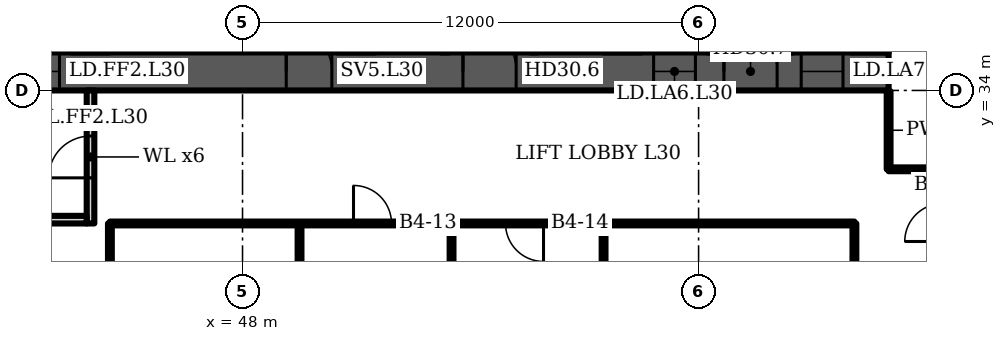
"""IFC4 building model, lengths in metres.
Left out: names, types, materials, properties, quantities, classifications, styles, units other than length and angle.
Written with IfcOpenShell. Run it as: python <this file> out.ifc"""

import sys

from ifc_helpers import new_model, si_unit, direction, frame, frame_2d, origin, place, context, subcontext, project, spatial, rectangle, extrude, element, fill, save


model = new_model("IFC4")
c1 = context("Model", 3, precision=1e-05, world=origin(), true_north=direction((0.0, 1.0)))
c2 = subcontext(c1, "Body", "Model", "MODEL_VIEW")
j1 = project(units=[si_unit("LENGTHUNIT", "METRE"), si_unit("PLANEANGLEUNIT", "RADIAN")], contexts=[c1])
p1 = place(None, origin())
s1 = spatial("IfcSite", under=j1, at=p1, CompositionType="ELEMENT")
p2 = place(p1, origin())
s2 = spatial("IfcBuilding", under=s1, at=p2, CompositionType="ELEMENT")
p3 = place(p2, frame((0.0, 0.0, 129.1)))
s3 = spatial("IfcBuildingStorey", under=s2, at=p3, CompositionType="ELEMENT", Elevation=129.1)
p4 = place(p3, frame((16.0, 34.5, 0.0), z_axis=(0.0, 0.0, 1.0), x_axis=(1.0, 0.0, 0.0)))
e1 = element("IfcWall", 1, at=p4, inside=s3, PredefinedType="SHEAR", context=c2, shape_type="SweptSolid", body=[
    extrude(rectangle(XDim=49.0, YDim=1.0, at=frame_2d((24.5, 0.0))), origin(), (0.0, 0.0, 1.0), 3.6),
])
p5 = place(p4, frame((1.2, 0.0, 0.0)))
e2 = element("IfcOpeningElement", 2, at=p5, cuts=e1, PredefinedType="OPENING", context=c2, shape_type="SweptSolid", body=[
    extrude(rectangle(XDim=1.1, YDim=2.1, at=frame_2d((0.55, 1.05))), frame((0.0, 0.51, 0.0), z_axis=(0.0, -1.0, 0.0), x_axis=(1.0, 0.0, 0.0)), (0.0, 0.0, 1.0), 1.02),
])
p6 = place(p4, frame((5.083, 0.0, 0.0)))
e3 = element("IfcOpeningElement", 3, at=p6, cuts=e1, PredefinedType="OPENING", context=c2, shape_type="SweptSolid", body=[
    extrude(rectangle(XDim=1.1, YDim=2.1, at=frame_2d((0.55, 1.05))), frame((0.0, 0.51, 0.0), z_axis=(0.0, -1.0, 0.0), x_axis=(1.0, 0.0, 0.0)), (0.0, 0.0, 1.0), 1.02),
])
p7 = place(p4, frame((2.933, 0.0, 0.0)))
e4 = element("IfcOpeningElement", 4, at=p7, cuts=e1, PredefinedType="OPENING", context=c2, shape_type="SweptSolid", body=[
    extrude(rectangle(XDim=1.4, YDim=2.1, at=frame_2d((0.7, 1.05))), frame((0.0, 0.51, 0.0), z_axis=(0.0, -1.0, 0.0), x_axis=(1.0, 0.0, 0.0)), (0.0, 0.0, 1.0), 1.02),
])
p8 = place(p4, frame((7.65, 0.0, 0.0)))
e5 = element("IfcOpeningElement", 5, at=p8, cuts=e1, PredefinedType="OPENING", context=c2, shape_type="SweptSolid", body=[
    extrude(rectangle(XDim=1.2, YDim=2.1, at=frame_2d((0.6, 1.05))), frame((0.0, 0.51, 0.0), z_axis=(0.0, -1.0, 0.0), x_axis=(1.0, 0.0, 0.0)), (0.0, 0.0, 1.0), 1.02),
])
p9 = place(p4, frame((14.817, 0.0, 0.0)))
e6 = element("IfcOpeningElement", 6, at=p9, cuts=e1, PredefinedType="OPENING", context=c2, shape_type="SweptSolid", body=[
    extrude(rectangle(XDim=1.1, YDim=2.1, at=frame_2d((0.55, 1.05))), frame((0.0, 0.51, 0.0), z_axis=(0.0, -1.0, 0.0), x_axis=(1.0, 0.0, 0.0)), (0.0, 0.0, 1.0), 1.02),
])
p10 = place(p4, frame((19.083, 0.0, 0.0)))
e7 = element("IfcOpeningElement", 7, at=p10, cuts=e1, PredefinedType="OPENING", context=c2, shape_type="SweptSolid", body=[
    extrude(rectangle(XDim=1.1, YDim=2.1, at=frame_2d((0.55, 1.05))), frame((0.0, 0.51, 0.0), z_axis=(0.0, -1.0, 0.0), x_axis=(1.0, 0.0, 0.0)), (0.0, 0.0, 1.0), 1.02),
])
p11 = place(p4, frame((16.8, 0.0, 0.0)))
e8 = element("IfcOpeningElement", 8, at=p11, cuts=e1, PredefinedType="OPENING", context=c2, shape_type="SweptSolid", body=[
    extrude(rectangle(XDim=1.4, YDim=2.1, at=frame_2d((0.7, 1.05))), frame((0.0, 0.51, 0.0), z_axis=(0.0, -1.0, 0.0), x_axis=(1.0, 0.0, 0.0)), (0.0, 0.0, 1.0), 1.02),
])
p12 = place(p4, frame((21.817, 0.0, 0.0)))
e9 = element("IfcOpeningElement", 9, at=p12, cuts=e1, PredefinedType="OPENING", context=c2, shape_type="SweptSolid", body=[
    extrude(rectangle(XDim=1.1, YDim=2.1, at=frame_2d((0.55, 1.05))), frame((0.0, 0.51, 0.0), z_axis=(0.0, -1.0, 0.0), x_axis=(1.0, 0.0, 0.0)), (0.0, 0.0, 1.0), 1.02),
])
p13 = place(p4, frame((26.083, 0.0, 0.0)))
e10 = element("IfcOpeningElement", 10, at=p13, cuts=e1, PredefinedType="OPENING", context=c2, shape_type="SweptSolid", body=[
    extrude(rectangle(XDim=1.1, YDim=2.1, at=frame_2d((0.55, 1.05))), frame((0.0, 0.51, 0.0), z_axis=(0.0, -1.0, 0.0), x_axis=(1.0, 0.0, 0.0)), (0.0, 0.0, 1.0), 1.02),
])
p14 = place(p4, frame((33.15, 0.0, 0.0)))
e11 = element("IfcOpeningElement", 11, at=p14, cuts=e1, PredefinedType="OPENING", context=c2, shape_type="SweptSolid", body=[
    extrude(rectangle(XDim=1.2, YDim=2.1, at=frame_2d((0.6, 1.05))), frame((0.0, 0.51, 0.0), z_axis=(0.0, -1.0, 0.0), x_axis=(1.0, 0.0, 0.0)), (0.0, 0.0, 1.0), 1.02),
])
p15 = place(p4, frame((37.8, 0.0, 0.0)))
e12 = element("IfcOpeningElement", 12, at=p15, cuts=e1, PredefinedType="OPENING", context=c2, shape_type="SweptSolid", body=[
    extrude(rectangle(XDim=1.4, YDim=2.1, at=frame_2d((0.7, 1.05))), frame((0.0, 0.51, 0.0), z_axis=(0.0, -1.0, 0.0), x_axis=(1.0, 0.0, 0.0)), (0.0, 0.0, 1.0), 1.02),
])
p16 = place(p4, frame((42.817, 0.0, 0.0)))
e13 = element("IfcOpeningElement", 13, at=p16, cuts=e1, PredefinedType="OPENING", context=c2, shape_type="SweptSolid", body=[
    extrude(rectangle(XDim=1.1, YDim=2.1, at=frame_2d((0.55, 1.05))), frame((0.0, 0.51, 0.0), z_axis=(0.0, -1.0, 0.0), x_axis=(1.0, 0.0, 0.0)), (0.0, 0.0, 1.0), 1.02),
])
p17 = place(p4, frame((46.7, 0.0, 0.0)))
e14 = element("IfcOpeningElement", 14, at=p17, cuts=e1, PredefinedType="OPENING", context=c2, shape_type="SweptSolid", body=[
    extrude(rectangle(XDim=1.1, YDim=2.1, at=frame_2d((0.55, 1.05))), frame((0.0, 0.51, 0.0), z_axis=(0.0, -1.0, 0.0), x_axis=(1.0, 0.0, 0.0)), (0.0, 0.0, 1.0), 1.02),
])
p18 = place(p4, frame((44.667, 0.0, 0.0)))
e15 = element("IfcOpeningElement", 15, at=p18, cuts=e1, PredefinedType="OPENING", context=c2, shape_type="SweptSolid", body=[
    extrude(rectangle(XDim=1.4, YDim=2.1, at=frame_2d((0.7, 1.05))), frame((0.0, 0.51, 0.0), z_axis=(0.0, -1.0, 0.0), x_axis=(1.0, 0.0, 0.0)), (0.0, 0.0, 1.0), 1.02),
])
p19 = place(p3, frame((44.0, 30.5, 0.0), z_axis=(0.0, 0.0, 1.0), x_axis=(0.0, 1.0, 0.0)))
e16 = element("IfcWall", 16, at=p19, inside=s3, PredefinedType="PARTITIONING", context=c2, shape_type="SweptSolid", body=[
    extrude(rectangle(XDim=3.5, YDim=0.2, at=frame_2d((1.75, 0.0))), origin(), (0.0, 0.0, 1.0), 3.2),
])
p20 = place(p19, frame((1.2, 0.0, 0.0)))
e17 = element("IfcOpeningElement", 17, at=p20, cuts=e16, PredefinedType="OPENING", context=c2, shape_type="SweptSolid", body=[
    extrude(rectangle(XDim=1.1, YDim=2.1, at=frame_2d((0.55, 1.05))), frame((0.0, 0.11, 0.0), z_axis=(0.0, -1.0, 0.0), x_axis=(1.0, 0.0, 0.0)), (0.0, 0.0, 1.0), 0.22),
])
p21 = place(p3, frame((41.1, 30.6, 0.0), z_axis=(0.0, 0.0, 1.0), x_axis=(1.0, 0.0, 0.0)))
e18 = element("IfcWall", 18, at=p21, inside=s3, PredefinedType="PARTITIONING", context=c2, shape_type="SweptSolid", body=[
    extrude(rectangle(XDim=2.8, YDim=0.2, at=frame_2d((1.4, 0.0))), origin(), (0.0, 0.0, 1.0), 3.2),
])
p22 = place(p3, frame((44.51, 8.437, 0.0), z_axis=(0.0, 0.0, 1.0), x_axis=(0.0, 1.0, 0.0)))
e19 = element("IfcWall", 19, at=p22, inside=s3, PredefinedType="PARTITIONING", context=c2, shape_type="SweptSolid", body=[
    extrude(rectangle(XDim=22.063, YDim=0.1, at=frame_2d((11.031, 0.0))), origin(), (0.0, 0.0, 1.0), 3.2),
])
p23 = place(p22, frame((12.683, 0.0, 0.0)))
e20 = element("IfcOpeningElement", 20, at=p23, cuts=e19, PredefinedType="OPENING", context=c2, shape_type="SweptSolid", body=[
    extrude(rectangle(XDim=1.8, YDim=2.1, at=frame_2d((0.9, 1.05))), frame((0.0, 0.06, 0.0), z_axis=(0.0, -1.0, 0.0), x_axis=(1.0, 0.0, 0.0)), (0.0, 0.0, 1.0), 0.12),
])
p24 = place(p3, frame((44.51, 30.5, 0.0), z_axis=(0.0, 0.0, 1.0), x_axis=(1.0, 0.0, 0.0)))
e21 = element("IfcWall", 21, at=p24, inside=s3, PredefinedType="PARTITIONING", context=c2, shape_type="SweptSolid", body=[
    extrude(rectangle(XDim=19.59, YDim=0.1, at=frame_2d((9.795, 0.0))), origin(), (0.0, 0.0, 1.0), 3.2),
])
p25 = place(p24, frame((6.41, 0.0, 0.0)))
e22 = element("IfcOpeningElement", 22, at=p25, cuts=e21, PredefinedType="OPENING", context=c2, shape_type="SweptSolid", body=[
    extrude(rectangle(XDim=1.0, YDim=2.1, at=frame_2d((0.5, 1.05))), frame((0.0, 0.06, 0.0), z_axis=(0.0, -1.0, 0.0), x_axis=(1.0, 0.0, 0.0)), (0.0, 0.0, 1.0), 0.12),
])
p26 = place(p24, frame((10.41, 0.0, 0.0)))
e23 = element("IfcOpeningElement", 23, at=p26, cuts=e21, PredefinedType="OPENING", context=c2, shape_type="SweptSolid", body=[
    extrude(rectangle(XDim=1.0, YDim=2.1, at=frame_2d((0.5, 1.05))), frame((0.0, 0.06, 0.0), z_axis=(0.0, -1.0, 0.0), x_axis=(1.0, 0.0, 0.0)), (0.0, 0.0, 1.0), 0.12),
])
p27 = place(p3, frame((49.5, -1.498, 0.0), z_axis=(0.0, 0.0, 1.0), x_axis=(0.0, 1.0, 0.0)))
e24 = element("IfcWall", 24, at=p27, inside=s3, PredefinedType="PARTITIONING", context=c2, shape_type="SweptSolid", body=[
    extrude(rectangle(XDim=31.998, YDim=0.1, at=frame_2d((15.999, 0.0))), origin(), (0.0, 0.0, 1.0), 3.2),
])
p28 = place(p3, frame((53.5, -1.148, 0.0), z_axis=(0.0, 0.0, 1.0), x_axis=(0.0, 1.0, 0.0)))
e25 = element("IfcWall", 25, at=p28, inside=s3, PredefinedType="PARTITIONING", context=c2, shape_type="SweptSolid", body=[
    extrude(rectangle(XDim=31.648, YDim=0.1, at=frame_2d((15.824, 0.0))), origin(), (0.0, 0.0, 1.0), 2.58),
])
p29 = place(p3, frame((57.5, -0.798, 0.0), z_axis=(0.0, 0.0, 1.0), x_axis=(0.0, 1.0, 0.0)))
e26 = element("IfcWall", 26, at=p29, inside=s3, PredefinedType="PARTITIONING", context=c2, shape_type="SweptSolid", body=[
    extrude(rectangle(XDim=31.298, YDim=0.1, at=frame_2d((15.649, 0.0))), origin(), (0.0, 0.0, 1.0), 2.58),
])
p30 = place(p3, frame((64.1, 10.095, 0.0), z_axis=(0.0, 0.0, 1.0), x_axis=(0.0, 1.0, 0.0)))
e27 = element("IfcWall", 27, at=p30, inside=s3, PredefinedType="PARTITIONING", context=c2, shape_type="SweptSolid", body=[
    extrude(rectangle(XDim=20.405, YDim=0.1, at=frame_2d((10.203, 0.0))), origin(), (0.0, 0.0, 1.0), 3.2),
])
p31 = place(p30, frame((8.905, 0.0, 0.0)))
e28 = element("IfcOpeningElement", 28, at=p31, cuts=e27, PredefinedType="OPENING", context=c2, shape_type="SweptSolid", body=[
    extrude(rectangle(XDim=1.0, YDim=2.1, at=frame_2d((0.5, 1.05))), frame((0.0, 0.06, 0.0), z_axis=(0.0, -1.0, 0.0), x_axis=(1.0, 0.0, 0.0)), (0.0, 0.0, 1.0), 0.12),
])
p32 = place(p3, frame((65.0, 31.925, 0.0), z_axis=(0.0, 0.0, 1.0), x_axis=(0.0, 1.0, 0.0)))
e29 = element("IfcWall", 29, at=p32, inside=s3, PredefinedType="PARTITIONING", context=c2, shape_type="SweptSolid", body=[
    extrude(rectangle(XDim=2.055, YDim=0.1, at=frame_2d((1.027, 0.0))), origin(), (0.0, 0.0, 1.0), 3.2),
])
p33 = place(p3, frame((65.0, 31.925, 0.0), z_axis=(0.0, 0.0, 1.0), x_axis=(1.0, 0.0, 0.0)))
e30 = element("IfcWall", 30, at=p33, inside=s3, PredefinedType="PARTITIONING", context=c2, shape_type="SweptSolid", body=[
    extrude(rectangle(XDim=1.425, YDim=0.1, at=frame_2d((0.712, 0.0))), origin(), (0.0, 0.0, 1.0), 3.2),
])
p34 = place(p3, frame((65.9, 27.435, 0.0), z_axis=(0.0, 0.0, 1.0), x_axis=(0.178584, 0.983924, 0.0)))
e31 = element("IfcWall", 31, at=p34, inside=s3, PredefinedType="PARTITIONING", context=c2, shape_type="SweptSolid", body=[
    extrude(rectangle(XDim=2.353, YDim=0.1, at=frame_2d((1.176, 0.0))), origin(), (0.0, 0.0, 1.0), 3.2),
])
p35 = place(p13, origin())
e32 = element("IfcDoor", 32, at=p35, inside=s3, OperationType="DOUBLE_DOOR_SLIDING", PredefinedType="DOOR", context=c2, shape_type="SweptSolid", body=[
    extrude(rectangle(XDim=1.1, YDim=2.1, at=frame_2d((0.55, 1.05))), frame((0.0, 0.025, 0.0), z_axis=(0.0, -1.0, 0.0), x_axis=(1.0, 0.0, 0.0)), (0.0, 0.0, 1.0), 0.05),
])
fill(e10, e32)
p36 = place(p14, origin())
e33 = element("IfcDoor", 33, at=p36, inside=s3, OperationType="SINGLE_SWING_LEFT", PredefinedType="DOOR", context=c2, shape_type="SweptSolid", body=[
    extrude(rectangle(XDim=1.2, YDim=2.1, at=frame_2d((0.6, 1.05))), frame((0.0, 0.025, 0.0), z_axis=(0.0, -1.0, 0.0), x_axis=(1.0, 0.0, 0.0)), (0.0, 0.0, 1.0), 0.05),
])
fill(e11, e33)
p37 = place(p15, origin())
e34 = element("IfcDoor", 34, at=p37, inside=s3, OperationType="DOUBLE_DOOR_SINGLE_SWING", PredefinedType="DOOR", context=c2, shape_type="SweptSolid", body=[
    extrude(rectangle(XDim=1.4, YDim=2.1, at=frame_2d((0.7, 1.05))), frame((0.0, 0.025, 0.0), z_axis=(0.0, -1.0, 0.0), x_axis=(1.0, 0.0, 0.0)), (0.0, 0.0, 1.0), 0.05),
])
fill(e12, e34)
p38 = place(p16, origin())
e35 = element("IfcDoor", 35, at=p38, inside=s3, OperationType="DOUBLE_DOOR_SLIDING", PredefinedType="DOOR", context=c2, shape_type="SweptSolid", body=[
    extrude(rectangle(XDim=1.1, YDim=2.1, at=frame_2d((0.55, 1.05))), frame((0.0, 0.025, 0.0), z_axis=(0.0, -1.0, 0.0), x_axis=(1.0, 0.0, 0.0)), (0.0, 0.0, 1.0), 0.05),
])
fill(e13, e35)
p39 = place(p17, origin())
e36 = element("IfcDoor", 36, at=p39, inside=s3, OperationType="DOUBLE_DOOR_SLIDING", PredefinedType="DOOR", context=c2, shape_type="SweptSolid", body=[
    extrude(rectangle(XDim=1.1, YDim=2.1, at=frame_2d((0.55, 1.05))), frame((0.0, 0.025, 0.0), z_axis=(0.0, -1.0, 0.0), x_axis=(1.0, 0.0, 0.0)), (0.0, 0.0, 1.0), 0.05),
])
fill(e14, e36)
p40 = place(p18, origin())
e37 = element("IfcDoor", 37, at=p40, inside=s3, OperationType="DOUBLE_DOOR_SINGLE_SWING", PredefinedType="DOOR", context=c2, shape_type="SweptSolid", body=[
    extrude(rectangle(XDim=1.4, YDim=2.1, at=frame_2d((0.7, 1.05))), frame((0.0, 0.025, 0.0), z_axis=(0.0, -1.0, 0.0), x_axis=(1.0, 0.0, 0.0)), (0.0, 0.0, 1.0), 0.05),
])
fill(e15, e37)
p41 = place(p20, origin())
e38 = element("IfcDoor", 38, at=p41, inside=s3, OperationType="SINGLE_SWING_LEFT", PredefinedType="DOOR", context=c2, shape_type="SweptSolid", body=[
    extrude(rectangle(XDim=1.1, YDim=2.1, at=frame_2d((0.55, 1.05))), frame((0.0, 0.025, 0.0), z_axis=(0.0, -1.0, 0.0), x_axis=(1.0, 0.0, 0.0)), (0.0, 0.0, 1.0), 0.05),
])
fill(e17, e38)
p42 = place(p25, origin())
e39 = element("IfcDoor", 39, at=p42, inside=s3, OperationType="SINGLE_SWING_LEFT", PredefinedType="DOOR", context=c2, shape_type="SweptSolid", body=[
    extrude(rectangle(XDim=1.0, YDim=2.1, at=frame_2d((0.5, 1.05))), frame((0.0, 0.025, 0.0), z_axis=(0.0, -1.0, 0.0), x_axis=(1.0, 0.0, 0.0)), (0.0, 0.0, 1.0), 0.05),
])
fill(e22, e39)
p43 = place(p26, origin())
e40 = element("IfcDoor", 40, at=p43, inside=s3, OperationType="SINGLE_SWING_RIGHT", PredefinedType="DOOR", context=c2, shape_type="SweptSolid", body=[
    extrude(rectangle(XDim=1.0, YDim=2.1, at=frame_2d((0.5, 1.05))), frame((0.0, 0.025, 0.0), z_axis=(0.0, -1.0, 0.0), x_axis=(1.0, 0.0, 0.0)), (0.0, 0.0, 1.0), 0.05),
])
fill(e23, e40)
save(model, sys.argv[1])
